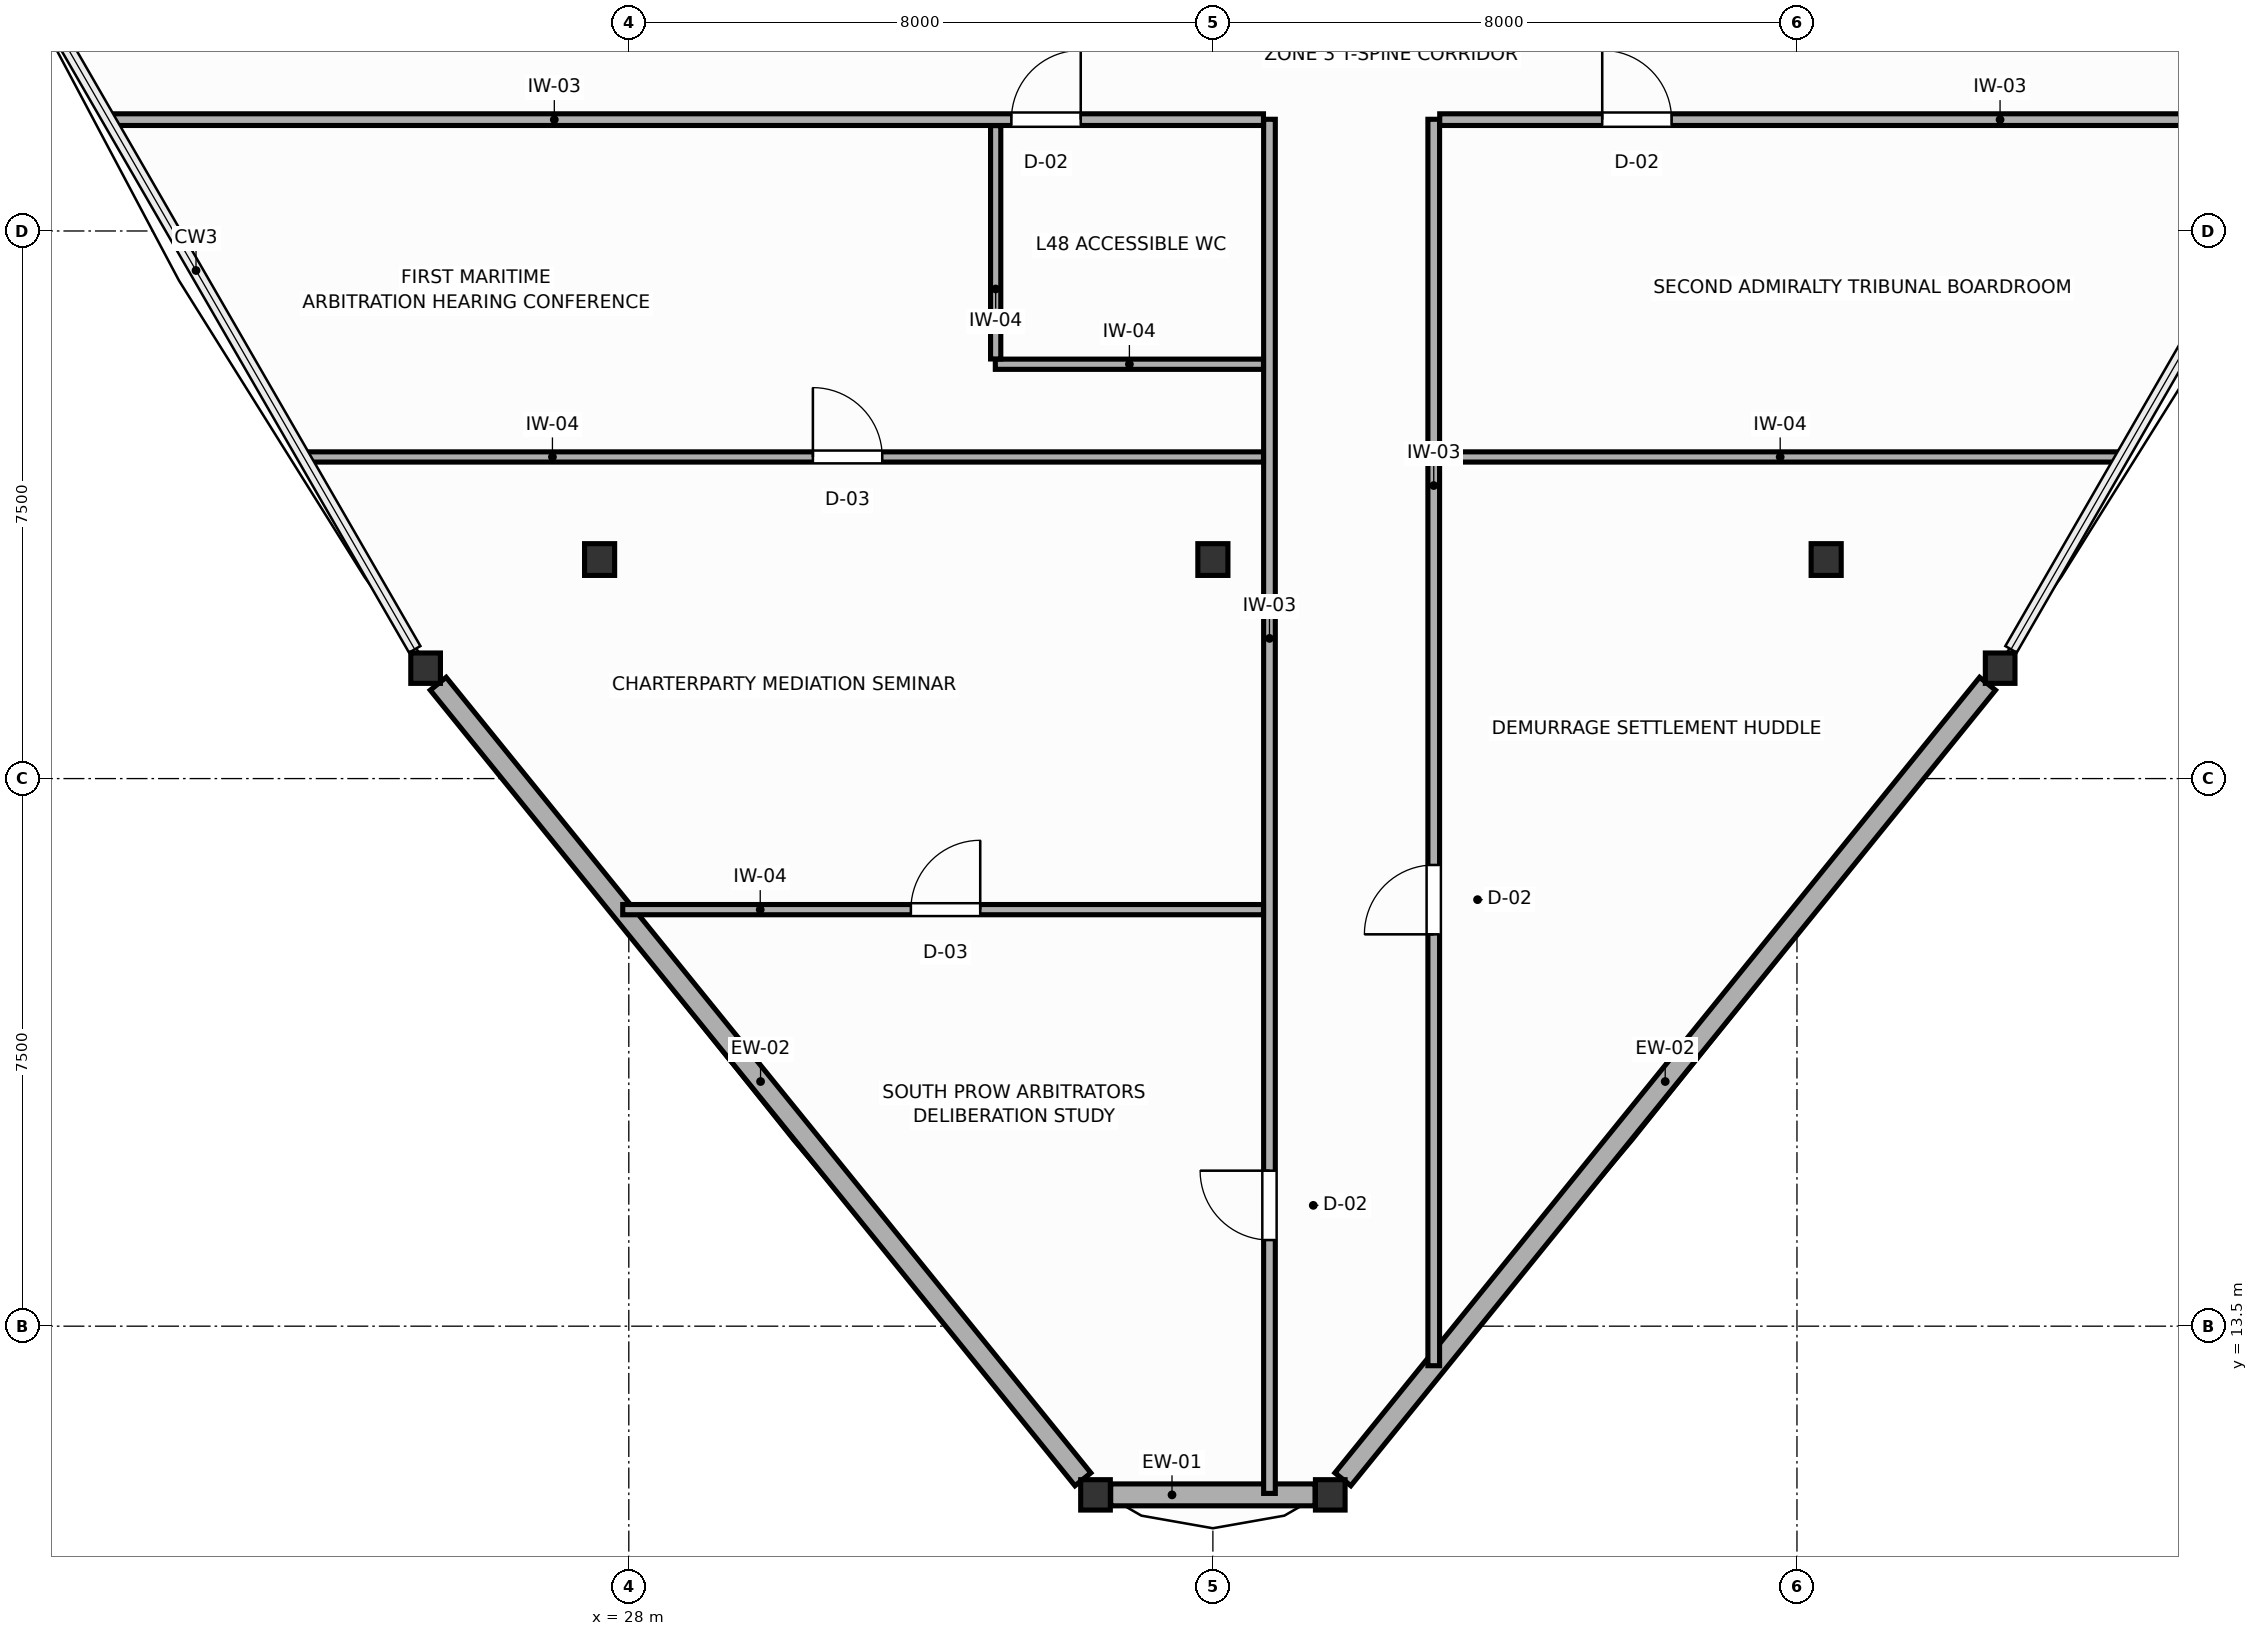
"""IFC4 building model, lengths in metres.
Left out: names, types, materials, properties, quantities, classifications, styles, units other than length and angle.
Written with IfcOpenShell. Run it as: python <this file> out.ifc"""

import sys

from ifc_helpers import new_model, si_unit, direction, frame, frame_2d, origin, origin_2d, place, context, subcontext, project, spatial, rectangle, i_section, extrude, source, transform, mapped, element, fill, save


model = new_model("IFC4")
c1 = context("Model", 3, precision=1e-05, world=origin(), true_north=direction((0.0, 1.0)))
c2 = subcontext(c1, "Body", "Model", "MODEL_VIEW")
j1 = project(units=[si_unit("LENGTHUNIT", "METRE"), si_unit("PLANEANGLEUNIT", "RADIAN")], contexts=[c1])
p1 = place(None, origin())
s1 = spatial("IfcSite", under=j1, at=p1, CompositionType="ELEMENT")
p2 = place(p1, origin())
s2 = spatial("IfcBuilding", under=s1, at=p2, CompositionType="ELEMENT")
p3 = place(p2, frame((0.0, 0.0, 186.6)))
s3 = spatial("IfcBuildingStorey", under=s2, at=p3, CompositionType="ELEMENT", Elevation=186.6)
m1 = source(origin(), c2, "Body", "SweptSolid", [
    extrude(i_section(OverallWidth=0.412, OverallDepth=0.435, WebThickness=0.033, FlangeThickness=0.053, FilletRadius=0.015, at=origin_2d()), origin(), (0.0, 0.0, 1.0), 3.6),
])
for number, where, z_axis, x_axis in (
    (1, (27.6, 24.0, 0.0), (0.0, 0.0, 1.0), (1.0, 0.0, 0.0)),
    (2, (44.4, 24.0, 0.0), (0.0, 0.0, 1.0), (1.0, 0.0, 0.0)),
    (3, (36.0, 24.0, 0.0), (0.0, 0.0, 1.0), (1.0, 0.0, 0.0)),
):
    element("IfcColumn", number, at=place(p3, frame(where, z_axis=z_axis, x_axis=x_axis)), inside=s3, PredefinedType="COLUMN", context=c2, shape_type="MappedRepresentation", body=[
        mapped(m1, transform((0.0, 0.0, 0.0), scale=1.0)),
    ])
m2 = source(origin(), c2, "Body", "SweptSolid", [
    extrude(i_section(OverallWidth=0.406, OverallDepth=0.416, WebThickness=0.027, FlangeThickness=0.044, FilletRadius=0.015, at=origin_2d()), origin(), (0.0, 0.0, 1.0), 3.6),
])
for number, where, z_axis, x_axis in (
    (4, (25.217, 22.512, 0.0), (0.0, 0.0, 1.0), (1.0, 0.0, 0.0)),
    (5, (34.392, 11.189, 0.0), (0.0, 0.0, 1.0), (1.0, 0.0, 0.0)),
    (6, (37.608, 11.189, 0.0), (0.0, 0.0, 1.0), (1.0, 0.0, 0.0)),
    (7, (46.783, 22.512, 0.0), (0.0, 0.0, 1.0), (1.0, 0.0, 0.0)),
):
    element("IfcColumn", number, at=place(p3, frame(where, z_axis=z_axis, x_axis=x_axis)), inside=s3, PredefinedType="COLUMN", context=c2, shape_type="MappedRepresentation", body=[
        mapped(m2, transform((0.0, 0.0, 0.0), scale=1.0)),
    ])
p4 = place(p3, frame((25.389, 22.299, 0.0), z_axis=(0.0, 0.0, 1.0), x_axis=(0.629601252026, -0.776918440666, 0.0)))
e8 = element("IfcWall", 8, at=p4, inside=s3, PredefinedType="SOLIDWALL", context=c2, shape_type="SweptSolid", body=[
    extrude(rectangle(XDim=14.025, YDim=0.28, at=frame_2d((7.013, 0.0))), origin(), (0.0, 0.0, 1.0), 1.87),
])
p5 = place(p3, frame((34.6, 11.189, 0.0), z_axis=(0.0, 0.0, 1.0), x_axis=(1.0, 0.0, 0.0)))
e9 = element("IfcWall", 9, at=p5, inside=s3, PredefinedType="SOLIDWALL", context=c2, shape_type="SweptSolid", body=[
    extrude(rectangle(XDim=2.799, YDim=0.3, at=frame_2d((1.4, 0.0))), origin(), (0.0, 0.0, 1.0), 1.87),
])
p6 = place(p3, frame((37.78, 11.403, 0.0), z_axis=(0.0, 0.0, 1.0), x_axis=(0.629601252026, 0.776918440666, 0.0)))
e10 = element("IfcWall", 10, at=p6, inside=s3, PredefinedType="SOLIDWALL", context=c2, shape_type="SweptSolid", body=[
    extrude(rectangle(XDim=14.025, YDim=0.28, at=frame_2d((7.013, 0.0))), origin(), (0.0, 0.0, 1.0), 1.87),
])
p7 = place(p3, frame((36.775, 11.209, 0.0), z_axis=(0.0, 0.0, 1.0), x_axis=(0.0, 1.0, 0.0)))
e11 = element("IfcWall", 11, at=p7, inside=s3, PredefinedType="PARTITIONING", context=c2, shape_type="SweptSolid", body=[
    extrude(rectangle(XDim=18.821, YDim=0.16, at=frame_2d((9.41, 0.0))), origin(), (0.0, 0.0, 1.0), 3.4),
])
p8 = place(p7, frame((3.47, 0.0, 0.0)))
e12 = element("IfcOpeningElement", 12, at=p8, cuts=e11, PredefinedType="OPENING", context=c2, shape_type="SweptSolid", body=[
    extrude(rectangle(XDim=0.95, YDim=2.05, at=frame_2d((0.475, 1.025))), frame((0.0, 0.09, 0.0), z_axis=(0.0, -1.0, 0.0), x_axis=(1.0, 0.0, 0.0)), (0.0, 0.0, 1.0), 0.18),
])
p9 = place(p3, frame((39.025, 12.958, 0.0), z_axis=(0.0, 0.0, 1.0), x_axis=(0.0, 1.0, 0.0)))
e13 = element("IfcWall", 13, at=p9, inside=s3, PredefinedType="PARTITIONING", context=c2, shape_type="SweptSolid", body=[
    extrude(rectangle(XDim=17.072, YDim=0.16, at=frame_2d((8.536, 0.0))), origin(), (0.0, 0.0, 1.0), 3.4),
])
p10 = place(p9, frame((5.908, 0.0, 0.0)))
e14 = element("IfcOpeningElement", 14, at=p10, cuts=e13, PredefinedType="OPENING", context=c2, shape_type="SweptSolid", body=[
    extrude(rectangle(XDim=0.95, YDim=2.05, at=frame_2d((0.475, 1.025))), frame((0.0, 0.09, 0.0), z_axis=(0.0, -1.0, 0.0), x_axis=(1.0, 0.0, 0.0)), (0.0, 0.0, 1.0), 0.18),
])
p11 = place(p3, frame((20.899, 30.025, 0.0), z_axis=(0.0, 0.0, 1.0), x_axis=(1.0, 0.0, 0.0)))
e15 = element("IfcWall", 15, at=p11, inside=s3, PredefinedType="PARTITIONING", context=c2, shape_type="SweptSolid", body=[
    extrude(rectangle(XDim=15.794, YDim=0.16, at=frame_2d((7.897, 0.0))), origin(), (0.0, 0.0, 1.0), 3.4),
])
p12 = place(p11, frame((12.341, 0.0, 0.0)))
e16 = element("IfcOpeningElement", 16, at=p12, cuts=e15, PredefinedType="OPENING", context=c2, shape_type="SweptSolid", body=[
    extrude(rectangle(XDim=0.95, YDim=2.05, at=frame_2d((0.475, 1.025))), frame((0.0, 0.09, 0.0), z_axis=(0.0, -1.0, 0.0), x_axis=(1.0, 0.0, 0.0)), (0.0, 0.0, 1.0), 0.18),
])
p13 = place(p3, frame((39.107, 30.025, 0.0), z_axis=(0.0, 0.0, 1.0), x_axis=(1.0, 0.0, 0.0)))
e17 = element("IfcWall", 17, at=p13, inside=s3, PredefinedType="PARTITIONING", context=c2, shape_type="SweptSolid", body=[
    extrude(rectangle(XDim=11.994, YDim=0.16, at=frame_2d((5.997, 0.0))), origin(), (0.0, 0.0, 1.0), 3.4),
])
p14 = place(p13, frame((2.226, 0.0, 0.0)))
e18 = element("IfcOpeningElement", 18, at=p14, cuts=e17, PredefinedType="OPENING", context=c2, shape_type="SweptSolid", body=[
    extrude(rectangle(XDim=0.95, YDim=2.05, at=frame_2d((0.475, 1.025))), frame((0.0, 0.09, 0.0), z_axis=(0.0, -1.0, 0.0), x_axis=(1.0, 0.0, 0.0)), (0.0, 0.0, 1.0), 0.18),
])
p15 = place(p3, frame((23.567, 25.405, 0.0), z_axis=(0.0, 0.0, 1.0), x_axis=(1.0, 0.0, 0.0)))
e19 = element("IfcWall", 19, at=p15, inside=s3, PredefinedType="PARTITIONING", context=c2, shape_type="SweptSolid", body=[
    extrude(rectangle(XDim=13.126, YDim=0.14, at=frame_2d((6.563, 0.0))), origin(), (0.0, 0.0, 1.0), 3.4),
])
p16 = place(p15, frame((6.955, 0.0, 0.0)))
e20 = element("IfcOpeningElement", 20, at=p16, cuts=e19, PredefinedType="OPENING", context=c2, shape_type="SweptSolid", body=[
    extrude(rectangle(XDim=0.95, YDim=2.05, at=frame_2d((0.475, 1.025))), frame((0.0, 0.08, 0.0), z_axis=(0.0, -1.0, 0.0), x_axis=(1.0, 0.0, 0.0)), (0.0, 0.0, 1.0), 0.16),
])
p17 = place(p3, frame((39.107, 25.405, 0.0), z_axis=(0.0, 0.0, 1.0), x_axis=(1.0, 0.0, 0.0)))
e21 = element("IfcWall", 21, at=p17, inside=s3, PredefinedType="PARTITIONING", context=c2, shape_type="SweptSolid", body=[
    extrude(rectangle(XDim=9.326, YDim=0.14, at=frame_2d((4.663, 0.0))), origin(), (0.0, 0.0, 1.0), 3.4),
])
p18 = place(p3, frame((27.917, 19.205, 0.0), z_axis=(0.0, 0.0, 1.0), x_axis=(1.0, 0.0, 0.0)))
e22 = element("IfcWall", 22, at=p18, inside=s3, PredefinedType="PARTITIONING", context=c2, shape_type="SweptSolid", body=[
    extrude(rectangle(XDim=8.776, YDim=0.14, at=frame_2d((4.388, 0.0))), origin(), (0.0, 0.0, 1.0), 3.4),
])
p19 = place(p18, frame((3.947, 0.0, 0.0)))
e23 = element("IfcOpeningElement", 23, at=p19, cuts=e22, PredefinedType="OPENING", context=c2, shape_type="SweptSolid", body=[
    extrude(rectangle(XDim=0.95, YDim=2.05, at=frame_2d((0.475, 1.025))), frame((0.0, 0.08, 0.0), z_axis=(0.0, -1.0, 0.0), x_axis=(1.0, 0.0, 0.0)), (0.0, 0.0, 1.0), 0.16),
])
p20 = place(p3, frame((33.02, 26.675, 0.0), z_axis=(0.0, 0.0, 1.0), x_axis=(1.0, 0.0, 0.0)))
e24 = element("IfcWall", 24, at=p20, inside=s3, PredefinedType="PARTITIONING", context=c2, shape_type="SweptSolid", body=[
    extrude(rectangle(XDim=3.673, YDim=0.14, at=frame_2d((1.836, 0.0))), origin(), (0.0, 0.0, 1.0), 3.4),
])
p21 = place(p3, frame((33.025, 26.747, 0.0), z_axis=(0.0, 0.0, 1.0), x_axis=(0.0, 1.0, 0.0)))
e25 = element("IfcWall", 25, at=p21, inside=s3, PredefinedType="PARTITIONING", context=c2, shape_type="SweptSolid", body=[
    extrude(rectangle(XDim=3.196, YDim=0.14, at=frame_2d((1.598, 0.0))), origin(), (0.0, 0.0, 1.0), 3.4),
])
p22 = place(p8, origin())
e26 = element("IfcDoor", 26, at=p22, inside=s3, OperationType="SINGLE_SWING_RIGHT", PredefinedType="DOOR", context=c2, shape_type="SweptSolid", body=[
    extrude(rectangle(XDim=0.95, YDim=2.05, at=frame_2d((0.475, 1.025))), frame((0.0, 0.025, 0.0), z_axis=(0.0, -1.0, 0.0), x_axis=(1.0, 0.0, 0.0)), (0.0, 0.0, 1.0), 0.05),
])
fill(e12, e26)
p23 = place(p10, origin())
e27 = element("IfcDoor", 27, at=p23, inside=s3, OperationType="SINGLE_SWING_LEFT", PredefinedType="DOOR", context=c2, shape_type="SweptSolid", body=[
    extrude(rectangle(XDim=0.95, YDim=2.05, at=frame_2d((0.475, 1.025))), frame((0.0, 0.025, 0.0), z_axis=(0.0, -1.0, 0.0), x_axis=(1.0, 0.0, 0.0)), (0.0, 0.0, 1.0), 0.05),
])
fill(e14, e27)
p24 = place(p12, origin())
e28 = element("IfcDoor", 28, at=p24, inside=s3, OperationType="SINGLE_SWING_RIGHT", PredefinedType="DOOR", context=c2, shape_type="SweptSolid", body=[
    extrude(rectangle(XDim=0.95, YDim=2.05, at=frame_2d((0.475, 1.025))), frame((0.0, 0.025, 0.0), z_axis=(0.0, -1.0, 0.0), x_axis=(1.0, 0.0, 0.0)), (0.0, 0.0, 1.0), 0.05),
])
fill(e16, e28)
p25 = place(p14, origin())
e29 = element("IfcDoor", 29, at=p25, inside=s3, OperationType="SINGLE_SWING_LEFT", PredefinedType="DOOR", context=c2, shape_type="SweptSolid", body=[
    extrude(rectangle(XDim=0.95, YDim=2.05, at=frame_2d((0.475, 1.025))), frame((0.0, 0.025, 0.0), z_axis=(0.0, -1.0, 0.0), x_axis=(1.0, 0.0, 0.0)), (0.0, 0.0, 1.0), 0.05),
])
fill(e18, e29)
p26 = place(p16, origin())
e30 = element("IfcDoor", 30, at=p26, inside=s3, OperationType="SINGLE_SWING_LEFT", PredefinedType="DOOR", context=c2, shape_type="SweptSolid", body=[
    extrude(rectangle(XDim=0.95, YDim=2.05, at=frame_2d((0.475, 1.025))), frame((0.0, 0.025, 0.0), z_axis=(0.0, -1.0, 0.0), x_axis=(1.0, 0.0, 0.0)), (0.0, 0.0, 1.0), 0.05),
])
fill(e20, e30)
p27 = place(p19, origin())
e31 = element("IfcDoor", 31, at=p27, inside=s3, OperationType="SINGLE_SWING_RIGHT", PredefinedType="DOOR", context=c2, shape_type="SweptSolid", body=[
    extrude(rectangle(XDim=0.95, YDim=2.05, at=frame_2d((0.475, 1.025))), frame((0.0, 0.025, 0.0), z_axis=(0.0, -1.0, 0.0), x_axis=(1.0, 0.0, 0.0)), (0.0, 0.0, 1.0), 0.05),
])
fill(e23, e31)
save(model, sys.argv[1])
